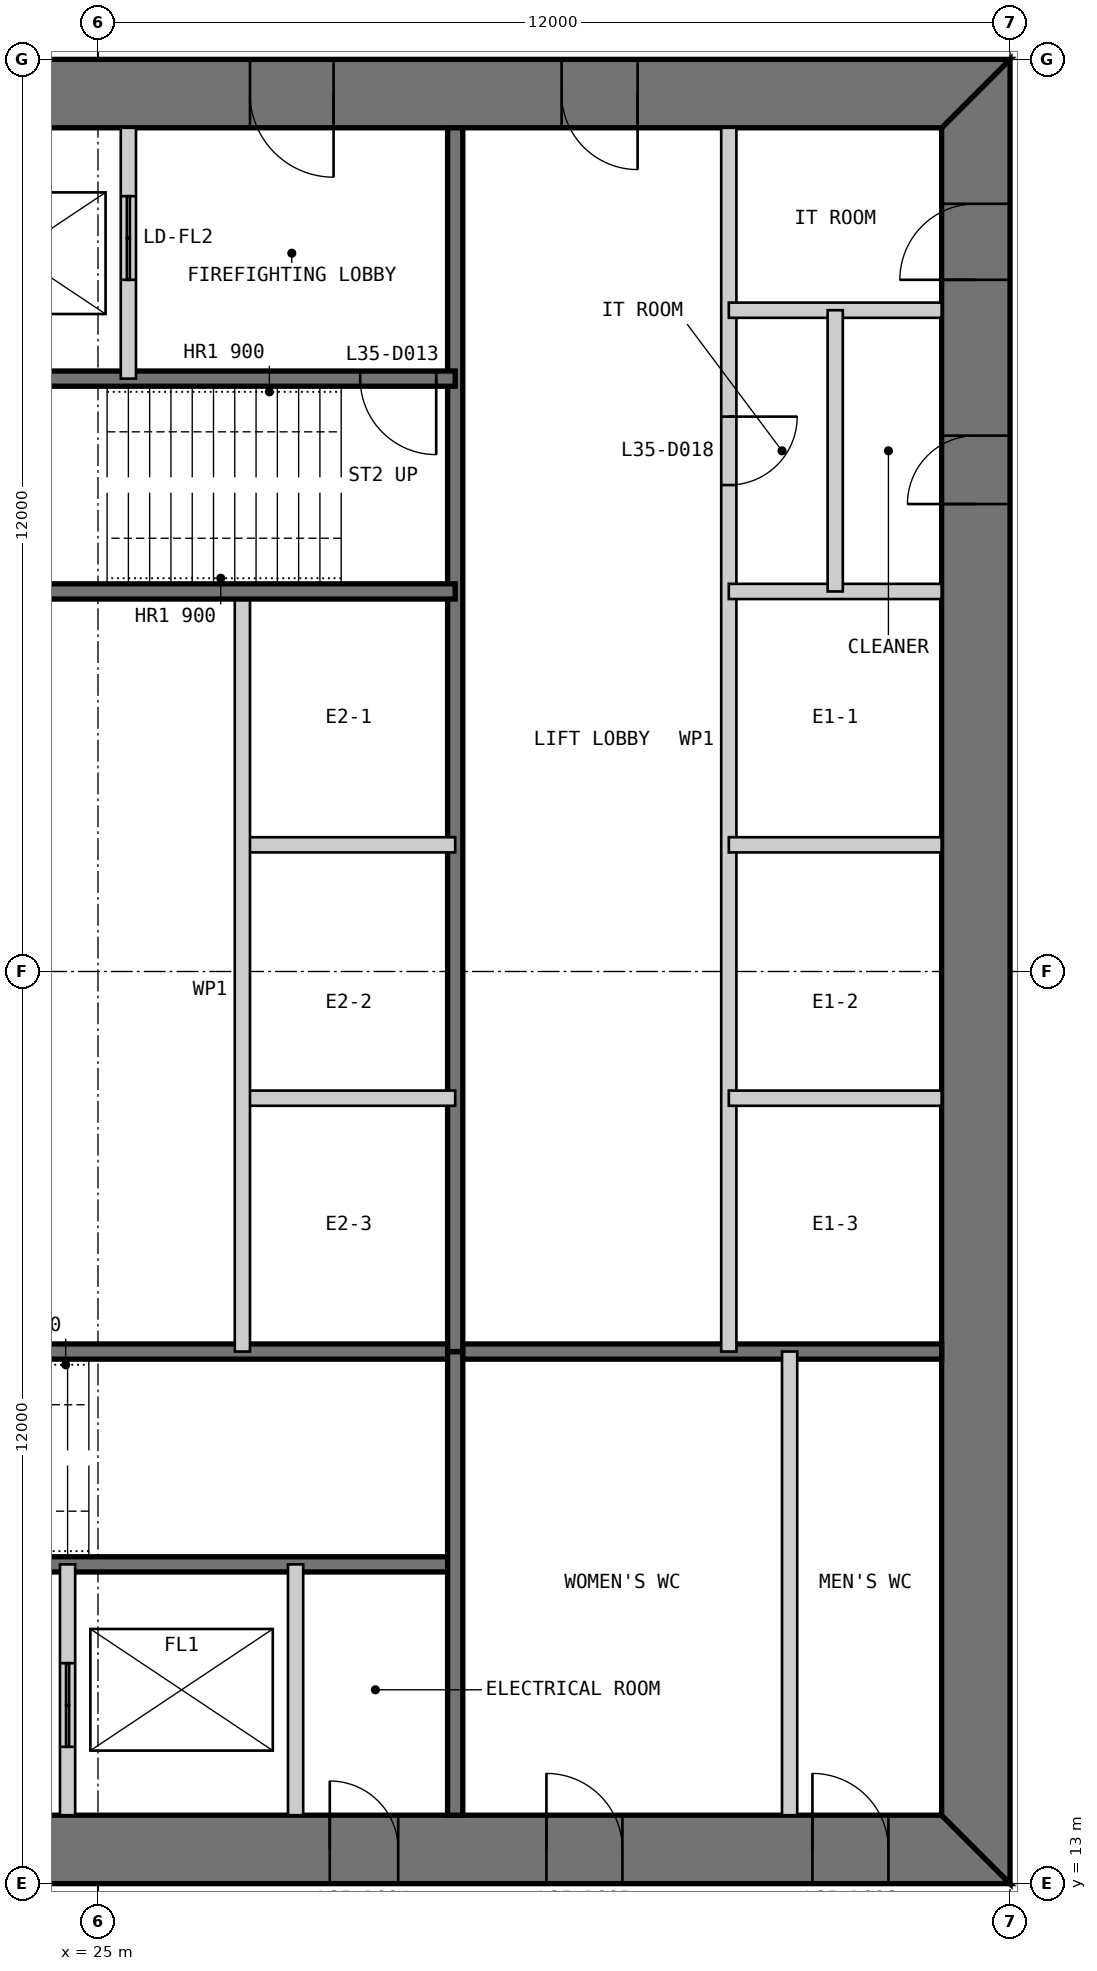
"""IFC4 building model, lengths in metres.
Left out: names, types, materials, properties, quantities, classifications, styles, units other than length and angle.
Written with IfcOpenShell. Run it as: python <this file> out.ifc"""

import sys

from ifc_helpers import new_model, si_unit, direction, frame, frame_2d, origin, place, context, subcontext, project, spatial, polyline, rectangle, outline, extrude, element, fill, save


model = new_model("IFC4")
c1 = context("Model", 3, precision=1e-05, world=origin(), true_north=direction((0.0, 1.0)))
c2 = subcontext(c1, "Body", "Model", "MODEL_VIEW")
j1 = project(units=[si_unit("LENGTHUNIT", "METRE"), si_unit("PLANEANGLEUNIT", "RADIAN")], contexts=[c1])
p1 = place(None, origin())
s1 = spatial("IfcSite", under=j1, at=p1, CompositionType="ELEMENT")
p2 = place(p1, origin())
s2 = spatial("IfcBuilding", under=s1, at=p2, CompositionType="ELEMENT")
p3 = place(p2, frame((0.0, 0.0, 150.4)))
s3 = spatial("IfcBuildingStorey", under=s2, at=p3, CompositionType="ELEMENT", Elevation=150.4)
p4 = place(p3, frame((13.0, 13.45, 0.0), z_axis=(0.0, 0.0, 1.0), x_axis=(1.0, 0.0, 0.0)))
e1 = element("IfcWall", 1, at=p4, inside=s3, PredefinedType="SHEAR", context=c2, shape_type="SweptSolid", body=[
    extrude(outline(polyline([(0.0, -0.45), (24.0, -0.45), (23.1, 0.45), (0.9, 0.45), (0.0, -0.45)])), origin(), (0.0, 0.0, 1.0), 4.0),
])
p5 = place(p4, frame((4.9, 0.0, 0.0)))
e2 = element("IfcOpeningElement", 2, at=p5, cuts=e1, PredefinedType="OPENING", context=c2, shape_type="SweptSolid", body=[
    extrude(rectangle(XDim=1.0, YDim=2.2, at=frame_2d((0.5, 1.1))), frame((0.0, 0.46, 0.0), z_axis=(0.0, -1.0, 0.0), x_axis=(1.0, 0.0, 0.0)), (0.0, 0.0, 1.0), 0.92),
])
p6 = place(p4, frame((8.9, 0.0, 0.0)))
e3 = element("IfcOpeningElement", 3, at=p6, cuts=e1, PredefinedType="OPENING", context=c2, shape_type="SweptSolid", body=[
    extrude(rectangle(XDim=1.1, YDim=2.2, at=frame_2d((0.55, 1.1))), frame((0.0, 0.46, 0.0), z_axis=(0.0, -1.0, 0.0), x_axis=(1.0, 0.0, 0.0)), (0.0, 0.0, 1.0), 0.92),
])
p7 = place(p4, frame((15.05, 0.0, 0.0)))
e4 = element("IfcOpeningElement", 4, at=p7, cuts=e1, PredefinedType="OPENING", context=c2, shape_type="SweptSolid", body=[
    extrude(rectangle(XDim=0.9, YDim=2.2, at=frame_2d((0.45, 1.1))), frame((0.0, 0.46, 0.0), z_axis=(0.0, -1.0, 0.0), x_axis=(1.0, 0.0, 0.0)), (0.0, 0.0, 1.0), 0.92),
])
p8 = place(p4, frame((17.9, 0.0, 0.0)))
e5 = element("IfcOpeningElement", 5, at=p8, cuts=e1, PredefinedType="OPENING", context=c2, shape_type="SweptSolid", body=[
    extrude(rectangle(XDim=1.0, YDim=2.2, at=frame_2d((0.5, 1.1))), frame((0.0, 0.46, 0.0), z_axis=(0.0, -1.0, 0.0), x_axis=(1.0, 0.0, 0.0)), (0.0, 0.0, 1.0), 0.92),
])
p9 = place(p4, frame((21.4, 0.0, 0.0)))
e6 = element("IfcOpeningElement", 6, at=p9, cuts=e1, PredefinedType="OPENING", context=c2, shape_type="SweptSolid", body=[
    extrude(rectangle(XDim=1.0, YDim=2.2, at=frame_2d((0.5, 1.1))), frame((0.0, 0.46, 0.0), z_axis=(0.0, -1.0, 0.0), x_axis=(1.0, 0.0, 0.0)), (0.0, 0.0, 1.0), 0.92),
])
p10 = place(p3, frame((36.55, 13.9, 0.0), z_axis=(0.0, 0.0, 1.0), x_axis=(0.0, 1.0, 0.0)))
e7 = element("IfcWall", 7, at=p10, inside=s3, PredefinedType="SHEAR", context=c2, shape_type="SweptSolid", body=[
    extrude(outline(polyline([(-0.9, -0.45), (23.1, -0.45), (22.2, 0.45), (0.0, 0.45), (-0.9, -0.45)])), origin(), (0.0, 0.0, 1.0), 4.0),
])
p11 = place(p10, frame((20.2, 0.0, 0.0)))
e8 = element("IfcOpeningElement", 8, at=p11, cuts=e7, PredefinedType="OPENING", context=c2, shape_type="SweptSolid", body=[
    extrude(rectangle(XDim=1.0, YDim=2.2, at=frame_2d((0.5, 1.1))), frame((0.0, 0.46, 0.0), z_axis=(0.0, -1.0, 0.0), x_axis=(1.0, 0.0, 0.0)), (0.0, 0.0, 1.0), 0.92),
])
p12 = place(p10, frame((17.25, 0.0, 0.0)))
e9 = element("IfcOpeningElement", 9, at=p12, cuts=e7, PredefinedType="OPENING", context=c2, shape_type="SweptSolid", body=[
    extrude(rectangle(XDim=0.9, YDim=2.2, at=frame_2d((0.45, 1.1))), frame((0.0, 0.46, 0.0), z_axis=(0.0, -1.0, 0.0), x_axis=(1.0, 0.0, 0.0)), (0.0, 0.0, 1.0), 0.92),
])
p13 = place(p3, frame((37.0, 36.55, 0.0), z_axis=(0.0, 0.0, 1.0), x_axis=(-1.0, 0.0, 0.0)))
e10 = element("IfcWall", 10, at=p13, inside=s3, PredefinedType="SHEAR", context=c2, shape_type="SweptSolid", body=[
    extrude(outline(polyline([(0.0, -0.45), (24.0, -0.45), (23.1, 0.45), (0.9, 0.45), (0.0, -0.45)])), origin(), (0.0, 0.0, 1.0), 4.0),
])
p14 = place(p13, frame((4.9, 0.0, 0.0)))
e11 = element("IfcOpeningElement", 11, at=p14, cuts=e10, PredefinedType="OPENING", context=c2, shape_type="SweptSolid", body=[
    extrude(rectangle(XDim=1.0, YDim=2.2, at=frame_2d((0.5, 1.1))), frame((0.0, 0.46, 0.0), z_axis=(0.0, -1.0, 0.0), x_axis=(1.0, 0.0, 0.0)), (0.0, 0.0, 1.0), 0.92),
])
p15 = place(p13, frame((8.9, 0.0, 0.0)))
e12 = element("IfcOpeningElement", 12, at=p15, cuts=e10, PredefinedType="OPENING", context=c2, shape_type="SweptSolid", body=[
    extrude(rectangle(XDim=1.1, YDim=2.2, at=frame_2d((0.55, 1.1))), frame((0.0, 0.46, 0.0), z_axis=(0.0, -1.0, 0.0), x_axis=(1.0, 0.0, 0.0)), (0.0, 0.0, 1.0), 0.92),
])
p16 = place(p13, frame((15.05, 0.0, 0.0)))
e13 = element("IfcOpeningElement", 13, at=p16, cuts=e10, PredefinedType="OPENING", context=c2, shape_type="SweptSolid", body=[
    extrude(rectangle(XDim=0.9, YDim=2.2, at=frame_2d((0.45, 1.1))), frame((0.0, 0.46, 0.0), z_axis=(0.0, -1.0, 0.0), x_axis=(1.0, 0.0, 0.0)), (0.0, 0.0, 1.0), 0.92),
])
p17 = place(p13, frame((17.9, 0.0, 0.0)))
e14 = element("IfcOpeningElement", 14, at=p17, cuts=e10, PredefinedType="OPENING", context=c2, shape_type="SweptSolid", body=[
    extrude(rectangle(XDim=1.0, YDim=2.2, at=frame_2d((0.5, 1.1))), frame((0.0, 0.46, 0.0), z_axis=(0.0, -1.0, 0.0), x_axis=(1.0, 0.0, 0.0)), (0.0, 0.0, 1.0), 0.92),
])
p18 = place(p13, frame((21.4, 0.0, 0.0)))
e15 = element("IfcOpeningElement", 15, at=p18, cuts=e10, PredefinedType="OPENING", context=c2, shape_type="SweptSolid", body=[
    extrude(rectangle(XDim=1.0, YDim=2.2, at=frame_2d((0.5, 1.1))), frame((0.0, 0.46, 0.0), z_axis=(0.0, -1.0, 0.0), x_axis=(1.0, 0.0, 0.0)), (0.0, 0.0, 1.0), 0.92),
])
p19 = place(p3, frame((20.3, 17.2, 0.0), z_axis=(0.0, 0.0, 1.0), x_axis=(1.0, 0.0, 0.0)))
e16 = element("IfcWall", 16, at=p19, inside=s3, PredefinedType="SOLIDWALL", context=c2, shape_type="SweptSolid", body=[
    extrude(rectangle(XDim=9.4, YDim=0.2, at=frame_2d((4.7, 0.0))), origin(), (0.0, 0.0, 1.0), 3.8),
])
p20 = place(p19, frame((0.25, 0.0, 0.0)))
e17 = element("IfcOpeningElement", 17, at=p20, cuts=e16, PredefinedType="OPENING", context=c2, shape_type="SweptSolid", body=[
    extrude(rectangle(XDim=1.0, YDim=2.2, at=frame_2d((0.5, 1.1))), frame((0.0, 0.11, 0.0), z_axis=(0.0, -1.0, 0.0), x_axis=(1.0, 0.0, 0.0)), (0.0, 0.0, 1.0), 0.22),
])
p21 = place(p3, frame((20.3, 20.0, 0.0), z_axis=(0.0, 0.0, 1.0), x_axis=(1.0, 0.0, 0.0)))
e18 = element("IfcWall", 18, at=p21, inside=s3, PredefinedType="SOLIDWALL", context=c2, shape_type="SweptSolid", body=[
    extrude(rectangle(XDim=15.8, YDim=0.2, at=frame_2d((7.9, 0.0))), origin(), (0.0, 0.0, 1.0), 3.8),
])
p22 = place(p3, frame((24.6, 13.9, 0.0), z_axis=(0.0, 0.0, 1.0), x_axis=(0.0, 1.0, 0.0)))
e19 = element("IfcWall", 19, at=p22, inside=s3, PredefinedType="PARTITIONING", context=c2, shape_type="SweptSolid", body=[
    extrude(rectangle(XDim=3.3, YDim=0.2, at=frame_2d((1.65, 0.0))), origin(), (0.0, 0.0, 1.0), 3.8),
])
p23 = place(p22, frame((0.9, 0.0, 0.0)))
e20 = element("IfcOpeningElement", 20, at=p23, cuts=e19, PredefinedType="OPENING", context=c2, shape_type="SweptSolid", body=[
    extrude(rectangle(XDim=1.1, YDim=2.2, at=frame_2d((0.55, 1.1))), frame((0.0, 0.11, 0.0), z_axis=(0.0, -1.0, 0.0), x_axis=(1.0, 0.0, 0.0)), (0.0, 0.0, 1.0), 0.22),
])
p24 = place(p3, frame((27.6, 13.9, 0.0), z_axis=(0.0, 0.0, 1.0), x_axis=(0.0, 1.0, 0.0)))
e21 = element("IfcWall", 21, at=p24, inside=s3, PredefinedType="PARTITIONING", context=c2, shape_type="SweptSolid", body=[
    extrude(rectangle(XDim=3.3, YDim=0.2, at=frame_2d((1.65, 0.0))), origin(), (0.0, 0.0, 1.0), 3.8),
])
p25 = place(p3, frame((29.7, 13.9, 0.0), z_axis=(0.0, 0.0, 1.0), x_axis=(0.0, 1.0, 0.0)))
e22 = element("IfcWall", 22, at=p25, inside=s3, PredefinedType="SOLIDWALL", context=c2, shape_type="SweptSolid", body=[
    extrude(rectangle(XDim=6.1, YDim=0.2, at=frame_2d((3.05, 0.0))), origin(), (0.0, 0.0, 1.0), 3.8),
])
p26 = place(p3, frame((34.1, 13.9, 0.0), z_axis=(0.0, 0.0, 1.0), x_axis=(0.0, 1.0, 0.0)))
e23 = element("IfcWall", 23, at=p26, inside=s3, PredefinedType="PARTITIONING", context=c2, shape_type="SweptSolid", body=[
    extrude(rectangle(XDim=6.1, YDim=0.2, at=frame_2d((3.05, 0.0))), origin(), (0.0, 0.0, 1.0), 3.8),
])
p27 = place(p3, frame((33.3, 36.1, 0.0), z_axis=(0.0, 0.0, 1.0), x_axis=(0.0, -1.0, 0.0)))
e24 = element("IfcWall", 24, at=p27, inside=s3, PredefinedType="PARTITIONING", context=c2, shape_type="SweptSolid", body=[
    extrude(rectangle(XDim=16.1, YDim=0.2, at=frame_2d((8.05, 0.0))), origin(), (0.0, 0.0, 1.0), 3.8),
])
p28 = place(p27, frame((3.8, 0.0, 0.0)))
e25 = element("IfcOpeningElement", 25, at=p28, cuts=e24, PredefinedType="OPENING", context=c2, shape_type="SweptSolid", body=[
    extrude(rectangle(XDim=0.9, YDim=2.2, at=frame_2d((0.45, 1.1))), frame((0.0, 0.11, 0.0), z_axis=(0.0, -1.0, 0.0), x_axis=(1.0, 0.0, 0.0)), (0.0, 0.0, 1.0), 0.22),
])
p29 = place(p3, frame((29.7, 36.1, 0.0), z_axis=(0.0, 0.0, 1.0), x_axis=(0.0, -1.0, 0.0)))
e26 = element("IfcWall", 26, at=p29, inside=s3, PredefinedType="SOLIDWALL", context=c2, shape_type="SweptSolid", body=[
    extrude(rectangle(XDim=16.1, YDim=0.2, at=frame_2d((8.05, 0.0))), origin(), (0.0, 0.0, 1.0), 3.8),
])
for number, where, z_axis, x_axis in (
    (27, (36.1, 30.0, 0.0), (0.0, 0.0, 1.0), (-1.0, 0.0, 0.0)),
    (28, (36.1, 26.667, 0.0), (0.0, 0.0, 1.0), (-1.0, 0.0, 0.0)),
    (29, (36.1, 23.333, 0.0), (0.0, 0.0, 1.0), (-1.0, 0.0, 0.0)),
    (30, (29.7, 26.667, 0.0), (0.0, 0.0, 1.0), (-1.0, 0.0, 0.0)),
    (31, (29.7, 23.333, 0.0), (0.0, 0.0, 1.0), (-1.0, 0.0, 0.0)),
):
    element("IfcWall", number, at=place(p3, frame(where, z_axis=z_axis, x_axis=x_axis)), inside=s3, PredefinedType="PARTITIONING", context=c2, shape_type="SweptSolid", body=[
        extrude(rectangle(XDim=2.8, YDim=0.2, at=frame_2d((1.4, 0.0))), origin(), (0.0, 0.0, 1.0), 3.8),
    ])
p30 = place(p3, frame((26.9, 30.0, 0.0), z_axis=(0.0, 0.0, 1.0), x_axis=(0.0, -1.0, 0.0)))
e32 = element("IfcWall", 32, at=p30, inside=s3, PredefinedType="PARTITIONING", context=c2, shape_type="SweptSolid", body=[
    extrude(rectangle(XDim=10.0, YDim=0.2, at=frame_2d((5.0, 0.0))), origin(), (0.0, 0.0, 1.0), 3.8),
])
p31 = place(p3, frame((29.7, 32.8, 0.0), z_axis=(0.0, 0.0, 1.0), x_axis=(-1.0, 0.0, 0.0)))
e33 = element("IfcWall", 33, at=p31, inside=s3, PredefinedType="SOLIDWALL", context=c2, shape_type="SweptSolid", body=[
    extrude(rectangle(XDim=9.4, YDim=0.2, at=frame_2d((4.7, 0.0))), origin(), (0.0, 0.0, 1.0), 3.8),
])
p32 = place(p31, frame((0.25, 0.0, 0.0)))
e34 = element("IfcOpeningElement", 34, at=p32, cuts=e33, PredefinedType="OPENING", context=c2, shape_type="SweptSolid", body=[
    extrude(rectangle(XDim=1.0, YDim=2.2, at=frame_2d((0.5, 1.1))), frame((0.0, 0.11, 0.0), z_axis=(0.0, -1.0, 0.0), x_axis=(1.0, 0.0, 0.0)), (0.0, 0.0, 1.0), 0.22),
])
p33 = place(p3, frame((29.7, 30.0, 0.0), z_axis=(0.0, 0.0, 1.0), x_axis=(-1.0, 0.0, 0.0)))
e35 = element("IfcWall", 35, at=p33, inside=s3, PredefinedType="SOLIDWALL", context=c2, shape_type="SweptSolid", body=[
    extrude(rectangle(XDim=15.8, YDim=0.2, at=frame_2d((7.9, 0.0))), origin(), (0.0, 0.0, 1.0), 3.8),
])
p34 = place(p3, frame((25.4, 36.1, 0.0), z_axis=(0.0, 0.0, 1.0), x_axis=(0.0, -1.0, 0.0)))
e36 = element("IfcWall", 36, at=p34, inside=s3, PredefinedType="PARTITIONING", context=c2, shape_type="SweptSolid", body=[
    extrude(rectangle(XDim=3.3, YDim=0.2, at=frame_2d((1.65, 0.0))), origin(), (0.0, 0.0, 1.0), 3.8),
])
p35 = place(p34, frame((0.9, 0.0, 0.0)))
e37 = element("IfcOpeningElement", 37, at=p35, cuts=e36, PredefinedType="OPENING", context=c2, shape_type="SweptSolid", body=[
    extrude(rectangle(XDim=1.1, YDim=2.2, at=frame_2d((0.55, 1.1))), frame((0.0, 0.11, 0.0), z_axis=(0.0, -1.0, 0.0), x_axis=(1.0, 0.0, 0.0)), (0.0, 0.0, 1.0), 0.22),
])
p36 = place(p3, frame((36.1, 33.7, 0.0), z_axis=(0.0, 0.0, 1.0), x_axis=(-1.0, 0.0, 0.0)))
e38 = element("IfcWall", 38, at=p36, inside=s3, PredefinedType="PARTITIONING", context=c2, shape_type="SweptSolid", body=[
    extrude(rectangle(XDim=2.8, YDim=0.2, at=frame_2d((1.4, 0.0))), origin(), (0.0, 0.0, 1.0), 3.8),
])
p37 = place(p3, frame((34.7, 33.7, 0.0), z_axis=(0.0, 0.0, 1.0), x_axis=(0.0, -1.0, 0.0)))
e39 = element("IfcWall", 39, at=p37, inside=s3, PredefinedType="PARTITIONING", context=c2, shape_type="SweptSolid", body=[
    extrude(rectangle(XDim=3.7, YDim=0.2, at=frame_2d((1.85, 0.0))), origin(), (0.0, 0.0, 1.0), 3.8),
])
p38 = place(p7, origin())
e40 = element("IfcDoor", 40, at=p38, inside=s3, OperationType="SINGLE_SWING_LEFT", PredefinedType="DOOR", context=c2, shape_type="SweptSolid", body=[
    extrude(rectangle(XDim=0.9, YDim=2.2, at=frame_2d((0.45, 1.1))), frame((0.0, 0.025, 0.0), z_axis=(0.0, -1.0, 0.0), x_axis=(1.0, 0.0, 0.0)), (0.0, 0.0, 1.0), 0.05),
    extrude(outline(polyline([(0.0, 0.0), (0.04, 0.0), (0.04, 2.16), (0.86, 2.16), (0.86, 0.0), (0.9, 0.0), (0.9, 2.2), (0.0, 2.2), (0.0, 0.0)])), frame((0.0, 0.3, 0.0), z_axis=(0.0, -1.0, 0.0), x_axis=(1.0, 0.0, 0.0)), (0.0, 0.0, 1.0), 0.6),
])
fill(e4, e40)
p39 = place(p8, origin())
e41 = element("IfcDoor", 41, at=p39, inside=s3, OperationType="SINGLE_SWING_LEFT", PredefinedType="DOOR", context=c2, shape_type="SweptSolid", body=[
    extrude(rectangle(XDim=1.0, YDim=2.2, at=frame_2d((0.5, 1.1))), frame((0.0, 0.025, 0.0), z_axis=(0.0, -1.0, 0.0), x_axis=(1.0, 0.0, 0.0)), (0.0, 0.0, 1.0), 0.05),
    extrude(outline(polyline([(0.0, 0.0), (0.04, 0.0), (0.04, 2.16), (0.96, 2.16), (0.96, 0.0), (1.0, 0.0), (1.0, 2.2), (0.0, 2.2), (0.0, 0.0)])), frame((0.0, 0.3, 0.0), z_axis=(0.0, -1.0, 0.0), x_axis=(1.0, 0.0, 0.0)), (0.0, 0.0, 1.0), 0.6),
])
fill(e5, e41)
p40 = place(p9, origin())
e42 = element("IfcDoor", 42, at=p40, inside=s3, OperationType="SINGLE_SWING_LEFT", PredefinedType="DOOR", context=c2, shape_type="SweptSolid", body=[
    extrude(rectangle(XDim=1.0, YDim=2.2, at=frame_2d((0.5, 1.1))), frame((0.0, 0.025, 0.0), z_axis=(0.0, -1.0, 0.0), x_axis=(1.0, 0.0, 0.0)), (0.0, 0.0, 1.0), 0.05),
    extrude(outline(polyline([(0.0, 0.0), (0.04, 0.0), (0.04, 2.16), (0.96, 2.16), (0.96, 0.0), (1.0, 0.0), (1.0, 2.2), (0.0, 2.2), (0.0, 0.0)])), frame((0.0, 0.3, 0.0), z_axis=(0.0, -1.0, 0.0), x_axis=(1.0, 0.0, 0.0)), (0.0, 0.0, 1.0), 0.6),
])
fill(e6, e42)
p41 = place(p14, origin())
e43 = element("IfcDoor", 43, at=p41, inside=s3, OperationType="SINGLE_SWING_LEFT", PredefinedType="DOOR", context=c2, shape_type="SweptSolid", body=[
    extrude(rectangle(XDim=1.0, YDim=2.2, at=frame_2d((0.5, 1.1))), frame((0.0, 0.025, 0.0), z_axis=(0.0, -1.0, 0.0), x_axis=(1.0, 0.0, 0.0)), (0.0, 0.0, 1.0), 0.05),
    extrude(outline(polyline([(0.0, 0.0), (0.04, 0.0), (0.04, 2.16), (0.96, 2.16), (0.96, 0.0), (1.0, 0.0), (1.0, 2.2), (0.0, 2.2), (0.0, 0.0)])), frame((0.0, 0.3, 0.0), z_axis=(0.0, -1.0, 0.0), x_axis=(1.0, 0.0, 0.0)), (0.0, 0.0, 1.0), 0.6),
])
fill(e11, e43)
p42 = place(p15, origin())
e44 = element("IfcDoor", 44, at=p42, inside=s3, OperationType="SINGLE_SWING_LEFT", PredefinedType="DOOR", context=c2, shape_type="SweptSolid", body=[
    extrude(rectangle(XDim=1.1, YDim=2.2, at=frame_2d((0.55, 1.1))), frame((0.0, 0.025, 0.0), z_axis=(0.0, -1.0, 0.0), x_axis=(1.0, 0.0, 0.0)), (0.0, 0.0, 1.0), 0.05),
    extrude(outline(polyline([(0.0, 0.0), (0.04, 0.0), (0.04, 2.16), (1.06, 2.16), (1.06, 0.0), (1.1, 0.0), (1.1, 2.2), (0.0, 2.2), (0.0, 0.0)])), frame((0.0, 0.3, 0.0), z_axis=(0.0, -1.0, 0.0), x_axis=(1.0, 0.0, 0.0)), (0.0, 0.0, 1.0), 0.6),
])
fill(e12, e44)
p43 = place(p32, origin())
e45 = element("IfcDoor", 45, at=p43, inside=s3, OperationType="SINGLE_SWING_LEFT", PredefinedType="DOOR", context=c2, shape_type="SweptSolid", body=[
    extrude(rectangle(XDim=1.0, YDim=2.2, at=frame_2d((0.5, 1.1))), frame((0.0, 0.025, 0.0), z_axis=(0.0, -1.0, 0.0), x_axis=(1.0, 0.0, 0.0)), (0.0, 0.0, 1.0), 0.05),
])
fill(e34, e45)
p44 = place(p11, origin())
e46 = element("IfcDoor", 46, at=p44, inside=s3, OperationType="SINGLE_SWING_LEFT", PredefinedType="DOOR", context=c2, shape_type="SweptSolid", body=[
    extrude(rectangle(XDim=1.0, YDim=2.2, at=frame_2d((0.5, 1.1))), frame((0.0, 0.025, 0.0), z_axis=(0.0, -1.0, 0.0), x_axis=(1.0, 0.0, 0.0)), (0.0, 0.0, 1.0), 0.05),
    extrude(outline(polyline([(0.0, 0.0), (0.04, 0.0), (0.04, 2.16), (0.96, 2.16), (0.96, 0.0), (1.0, 0.0), (1.0, 2.2), (0.0, 2.2), (0.0, 0.0)])), frame((0.0, 0.3, 0.0), z_axis=(0.0, -1.0, 0.0), x_axis=(1.0, 0.0, 0.0)), (0.0, 0.0, 1.0), 0.6),
])
fill(e8, e46)
p45 = place(p28, origin())
e47 = element("IfcDoor", 47, at=p45, inside=s3, OperationType="SINGLE_SWING_LEFT", PredefinedType="DOOR", context=c2, shape_type="SweptSolid", body=[
    extrude(rectangle(XDim=0.9, YDim=2.2, at=frame_2d((0.45, 1.1))), frame((0.0, 0.025, 0.0), z_axis=(0.0, -1.0, 0.0), x_axis=(1.0, 0.0, 0.0)), (0.0, 0.0, 1.0), 0.05),
])
fill(e25, e47)
p46 = place(p12, origin())
e48 = element("IfcDoor", 48, at=p46, inside=s3, OperationType="SINGLE_SWING_LEFT", PredefinedType="DOOR", context=c2, shape_type="SweptSolid", body=[
    extrude(rectangle(XDim=0.9, YDim=2.2, at=frame_2d((0.45, 1.1))), frame((0.0, 0.025, 0.0), z_axis=(0.0, -1.0, 0.0), x_axis=(1.0, 0.0, 0.0)), (0.0, 0.0, 1.0), 0.05),
    extrude(outline(polyline([(0.0, 0.0), (0.04, 0.0), (0.04, 2.16), (0.86, 2.16), (0.86, 0.0), (0.9, 0.0), (0.9, 2.2), (0.0, 2.2), (0.0, 0.0)])), frame((0.0, 0.3, 0.0), z_axis=(0.0, -1.0, 0.0), x_axis=(1.0, 0.0, 0.0)), (0.0, 0.0, 1.0), 0.6),
])
fill(e9, e48)
p47 = place(p23, origin())
e49 = element("IfcDoor", 49, at=p47, inside=s3, OperationType="DOUBLE_DOOR_SLIDING", PredefinedType="DOOR", context=c2, shape_type="SweptSolid", body=[
    extrude(rectangle(XDim=1.1, YDim=2.2, at=frame_2d((0.55, 1.1))), frame((0.0, 0.025, 0.0), z_axis=(0.0, -1.0, 0.0), x_axis=(1.0, 0.0, 0.0)), (0.0, 0.0, 1.0), 0.05),
])
fill(e20, e49)
p48 = place(p35, origin())
e50 = element("IfcDoor", 50, at=p48, inside=s3, OperationType="DOUBLE_DOOR_SLIDING", PredefinedType="DOOR", context=c2, shape_type="SweptSolid", body=[
    extrude(rectangle(XDim=1.1, YDim=2.2, at=frame_2d((0.55, 1.1))), frame((0.0, 0.025, 0.0), z_axis=(0.0, -1.0, 0.0), x_axis=(1.0, 0.0, 0.0)), (0.0, 0.0, 1.0), 0.05),
])
fill(e37, e50)
save(model, sys.argv[1])
